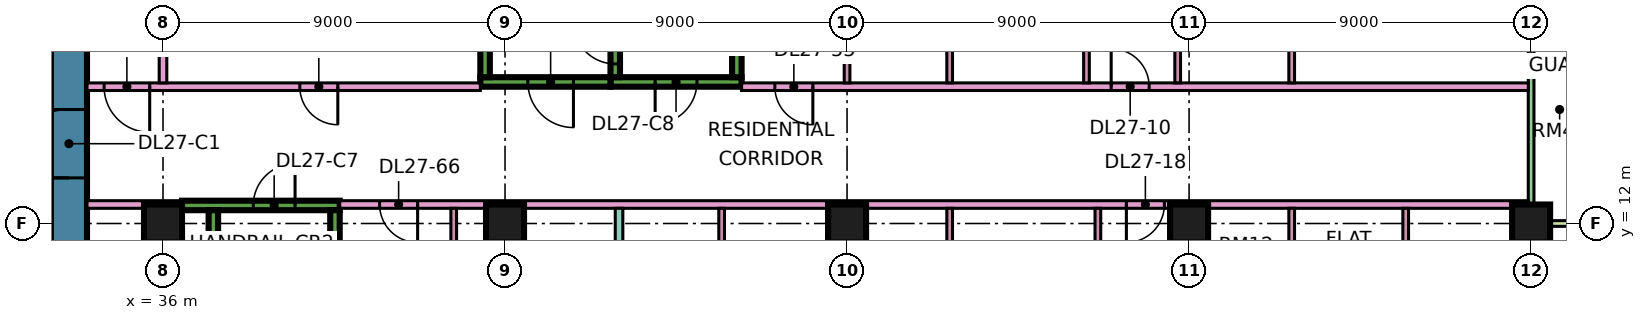
"""IFC4 building model, lengths in metres.
Left out: names, types, materials, properties, quantities, classifications, styles, units other than length and angle.
Written with IfcOpenShell. Run it as: python <this file> out.ifc"""

import sys

from ifc_helpers import new_model, si_unit, direction, frame, frame_2d, origin, origin_2d, place, context, subcontext, project, spatial, rectangle, extrude, element, fill, save


model = new_model("IFC4")
c1 = context("Model", 3, precision=1e-05, world=origin(), true_north=direction((0.0, 1.0)))
c2 = subcontext(c1, "Body", "Model", "MODEL_VIEW")
j1 = project(units=[si_unit("LENGTHUNIT", "METRE"), si_unit("PLANEANGLEUNIT", "RADIAN")], contexts=[c1])
p1 = place(None, origin())
s1 = spatial("IfcSite", under=j1, at=p1, CompositionType="ELEMENT")
p2 = place(p1, origin())
s2 = spatial("IfcBuilding", under=s1, at=p2, CompositionType="ELEMENT")
p3 = place(p2, frame((0.0, 0.0, 118.15)))
s3 = spatial("IfcBuildingStorey", under=s2, at=p3, CompositionType="ELEMENT", Elevation=118.15)
for number, where, z_axis, x_axis in (
    (1, (36.0, 12.0, 0.0), (0.0, 0.0, 1.0), (1.0, 0.0, 0.0)),
    (2, (45.0, 12.0, 0.0), (0.0, 0.0, 1.0), (1.0, 0.0, 0.0)),
    (3, (54.0, 12.0, 0.0), (0.0, 0.0, 1.0), (1.0, 0.0, 0.0)),
    (4, (63.0, 12.0, 0.0), (0.0, 0.0, 1.0), (1.0, 0.0, 0.0)),
    (5, (72.0, 12.0, 0.0), (0.0, 0.0, 1.0), (1.0, 0.0, 0.0)),
):
    element("IfcColumn", number, at=place(p3, frame(where, z_axis=z_axis, x_axis=x_axis)), inside=s3, PredefinedType="COLUMN", context=c2, shape_type="SweptSolid", body=[
        extrude(rectangle(XDim=1.0, YDim=1.0, at=origin_2d()), origin(), (0.0, 0.0, 1.0), 3.75),
    ])
p4 = place(p3, frame((33.525, 7.95, 0.0), z_axis=(0.0, 0.0, 1.0), x_axis=(0.0, 1.0, 0.0)))
e6 = element("IfcWall", 6, at=p4, inside=s3, PredefinedType="SHEAR", context=c2, shape_type="SweptSolid", body=[
    extrude(rectangle(XDim=11.1, YDim=0.95, at=frame_2d((5.55, 0.0))), origin(), (0.0, 0.0, 1.0), 3.75),
])
p5 = place(p4, frame((5.25, 0.0, 0.0)))
e7 = element("IfcOpeningElement", 7, at=p5, cuts=e6, PredefinedType="OPENING", context=c2, shape_type="SweptSolid", body=[
    extrude(rectangle(XDim=1.8, YDim=2.4, at=frame_2d((0.9, 1.2))), frame((0.0, 0.485, 0.0), z_axis=(0.0, -1.0, 0.0), x_axis=(1.0, 0.0, 0.0)), (0.0, 0.0, 1.0), 0.97),
])
p6 = place(p3, frame((36.5, 12.475, 0.0), z_axis=(0.0, 0.0, 1.0), x_axis=(1.0, 0.0, 0.0)))
e8 = element("IfcWall", 8, at=p6, inside=s3, PredefinedType="SHEAR", context=c2, shape_type="SweptSolid", body=[
    extrude(rectangle(XDim=4.15, YDim=0.25, at=frame_2d((2.075, 0.0))), origin(), (0.0, 0.0, 1.0), 3.75),
])
p7 = place(p6, frame((1.875, 0.0, 0.0)))
e9 = element("IfcOpeningElement", 9, at=p7, cuts=e8, PredefinedType="OPENING", context=c2, shape_type="SweptSolid", body=[
    extrude(rectangle(XDim=1.1, YDim=2.2, at=frame_2d((0.55, 1.1))), frame((0.0, 0.135, 0.0), z_axis=(0.0, -1.0, 0.0), x_axis=(1.0, 0.0, 0.0)), (0.0, 0.0, 1.0), 0.27),
])
for number, where, z_axis, x_axis in (
    (10, (37.325, 5.85, 0.0), (0.0, 0.0, 1.0), (0.0, 1.0, 0.0)),
    (11, (40.525, 5.85, 0.0), (0.0, 0.0, 1.0), (0.0, 1.0, 0.0)),
):
    element("IfcWall", number, at=place(p3, frame(where, z_axis=z_axis, x_axis=x_axis)), inside=s3, PredefinedType="SHEAR", context=c2, shape_type="SweptSolid", body=[
        extrude(rectangle(XDim=6.5, YDim=0.25, at=frame_2d((3.25, 0.0))), origin(), (0.0, 0.0, 1.0), 3.75),
    ])
p8 = place(p3, frame((47.775, 15.725, 0.0), z_axis=(0.0, 0.0, 1.0), x_axis=(1.0, 0.0, 0.0)))
e12 = element("IfcWall", 12, at=p8, inside=s3, PredefinedType="SHEAR", context=c2, shape_type="SweptSolid", body=[
    extrude(rectangle(XDim=3.45, YDim=0.25, at=frame_2d((1.725, 0.0))), origin(), (0.0, 0.0, 1.0), 3.75),
])
p9 = place(p8, frame((1.175, 0.0, 0.0)))
e13 = element("IfcOpeningElement", 13, at=p9, cuts=e12, PredefinedType="OPENING", context=c2, shape_type="SweptSolid", body=[
    extrude(rectangle(XDim=1.1, YDim=2.2, at=frame_2d((0.55, 1.1))), frame((0.0, 0.135, 0.0), z_axis=(0.0, -1.0, 0.0), x_axis=(1.0, 0.0, 0.0)), (0.0, 0.0, 1.0), 0.27),
])
p10 = place(p3, frame((47.9, 15.85, 0.0), z_axis=(0.0, 0.0, 1.0), x_axis=(0.0, 1.0, 0.0)))
e14 = element("IfcWall", 14, at=p10, inside=s3, PredefinedType="SHEAR", context=c2, shape_type="SweptSolid", body=[
    extrude(rectangle(XDim=6.5, YDim=0.25, at=frame_2d((3.25, 0.0))), origin(), (0.0, 0.0, 1.0), 3.75),
])
p11 = place(p10, frame((0.35, 0.0, 0.0)))
e15 = element("IfcOpeningElement", 15, at=p11, cuts=e14, PredefinedType="OPENING", context=c2, shape_type="SweptSolid", body=[
    extrude(rectangle(XDim=1.1, YDim=2.2, at=frame_2d((0.55, 1.1))), frame((0.0, 0.135, 0.0), z_axis=(0.0, -1.0, 0.0), x_axis=(1.0, 0.0, 0.0)), (0.0, 0.0, 1.0), 0.27),
])
p12 = place(p3, frame((51.1, 15.85, 0.0), z_axis=(0.0, 0.0, 1.0), x_axis=(0.0, 1.0, 0.0)))
e16 = element("IfcWall", 16, at=p12, inside=s3, PredefinedType="SHEAR", context=c2, shape_type="SweptSolid", body=[
    extrude(rectangle(XDim=6.5, YDim=0.25, at=frame_2d((3.25, 0.0))), origin(), (0.0, 0.0, 1.0), 3.75),
])
p13 = place(p3, frame((44.35, 15.725, 0.0), z_axis=(0.0, 0.0, 1.0), x_axis=(1.0, 0.0, 0.0)))
e17 = element("IfcWall", 17, at=p13, inside=s3, PredefinedType="SHEAR", context=c2, shape_type="SweptSolid", body=[
    extrude(rectangle(XDim=3.425, YDim=0.25, at=frame_2d((1.712, 0.0))), origin(), (0.0, 0.0, 1.0), 3.75),
])
p14 = place(p13, frame((1.25, 0.0, 0.0)))
e18 = element("IfcOpeningElement", 18, at=p14, cuts=e17, PredefinedType="OPENING", context=c2, shape_type="SweptSolid", body=[
    extrude(rectangle(XDim=1.2, YDim=2.2, at=frame_2d((0.6, 1.1))), frame((0.0, 0.135, 0.0), z_axis=(0.0, -1.0, 0.0), x_axis=(1.0, 0.0, 0.0)), (0.0, 0.0, 1.0), 0.27),
])
p15 = place(p3, frame((44.475, 15.85, 0.0), z_axis=(0.0, 0.0, 1.0), x_axis=(0.0, 1.0, 0.0)))
e19 = element("IfcWall", 19, at=p15, inside=s3, PredefinedType="SHEAR", context=c2, shape_type="SweptSolid", body=[
    extrude(rectangle(XDim=6.5, YDim=0.25, at=frame_2d((3.25, 0.0))), origin(), (0.0, 0.0, 1.0), 3.75),
])
p16 = place(p15, frame((1.75, 0.0, 0.0)))
e20 = element("IfcOpeningElement", 20, at=p16, cuts=e19, PredefinedType="OPENING", context=c2, shape_type="SweptSolid", body=[
    extrude(rectangle(XDim=1.1, YDim=2.2, at=frame_2d((0.55, 1.1))), frame((0.0, 0.135, 0.0), z_axis=(0.0, -1.0, 0.0), x_axis=(1.0, 0.0, 0.0)), (0.0, 0.0, 1.0), 0.27),
])
p17 = place(p15, frame((4.3, 0.0, 0.0)))
e21 = element("IfcOpeningElement", 21, at=p17, cuts=e19, PredefinedType="OPENING", context=c2, shape_type="SweptSolid", body=[
    extrude(rectangle(XDim=1.1, YDim=2.2, at=frame_2d((0.55, 1.1))), frame((0.0, 0.135, 0.0), z_axis=(0.0, -1.0, 0.0), x_axis=(1.0, 0.0, 0.0)), (0.0, 0.0, 1.0), 0.27),
])
p18 = place(p3, frame((72.0, 12.075, 0.0), z_axis=(0.0, 0.0, 1.0), x_axis=(0.0, 1.0, 0.0)))
e22 = element("IfcWall", 22, at=p18, inside=s3, PredefinedType="SOLIDWALL", context=c2, shape_type="SweptSolid", body=[
    extrude(rectangle(XDim=10.35, YDim=0.15, at=frame_2d((5.175, 0.0))), origin(), (0.0, 0.0, 1.0), 3.35),
])
p19 = place(p18, frame((3.975, 0.0, 0.45)))
e23 = element("IfcOpeningElement", 23, at=p19, cuts=e22, PredefinedType="OPENING", context=c2, shape_type="SweptSolid", body=[
    extrude(rectangle(XDim=2.4, YDim=2.4, at=frame_2d((1.2, 1.2))), frame((0.0, 0.085, 0.0), z_axis=(0.0, -1.0, 0.0), x_axis=(1.0, 0.0, 0.0)), (0.0, 0.0, 1.0), 0.17),
])
p20 = place(p18, frame((7.688, 0.0, 0.0)))
e24 = element("IfcOpeningElement", 24, at=p20, cuts=e22, PredefinedType="OPENING", context=c2, shape_type="SweptSolid", body=[
    extrude(rectangle(XDim=1.8, YDim=2.4, at=frame_2d((0.9, 1.2))), frame((0.0, 0.085, 0.0), z_axis=(0.0, -1.0, 0.0), x_axis=(1.0, 0.0, 0.0)), (0.0, 0.0, 1.0), 0.17),
])
p21 = place(p3, frame((73.5, 12.0, 0.0), z_axis=(0.0, 0.0, 1.0), x_axis=(-1.0, 0.0, 0.0)))
e25 = element("IfcWall", 25, at=p21, inside=s3, PredefinedType="SOLIDWALL", context=c2, shape_type="SweptSolid", body=[
    extrude(rectangle(XDim=1.5, YDim=0.15, at=frame_2d((0.75, 0.0))), origin(), (0.0, 0.0, 1.0), 3.35),
])
p22 = place(p3, frame((34.0, 12.5, 0.0), z_axis=(0.0, 0.0, 1.0), x_axis=(1.0, 0.0, 0.0)))
e26 = element("IfcWall", 26, at=p22, inside=s3, PredefinedType="PARTITIONING", context=c2, shape_type="SweptSolid", body=[
    extrude(rectangle(XDim=2.501, YDim=0.2, at=frame_2d((1.25, 0.0))), origin(), (0.0, 0.0, 1.0), 3.35),
])
p23 = place(p3, frame((34.0, 15.6, 0.0), z_axis=(0.0, 0.0, 1.0), x_axis=(1.0, 0.0, 0.0)))
e27 = element("IfcWall", 27, at=p23, inside=s3, PredefinedType="PARTITIONING", context=c2, shape_type="SweptSolid", body=[
    extrude(rectangle(XDim=10.35, YDim=0.2, at=frame_2d((5.175, 0.0))), origin(), (0.0, 0.0, 1.0), 3.35),
])
p24 = place(p23, frame((5.6, 0.0, 0.0)))
e28 = element("IfcOpeningElement", 28, at=p24, cuts=e27, PredefinedType="OPENING", context=c2, shape_type="SweptSolid", body=[
    extrude(rectangle(XDim=1.0, YDim=2.1, at=frame_2d((0.5, 1.05))), frame((0.0, 0.11, 0.0), z_axis=(0.0, -1.0, 0.0), x_axis=(1.0, 0.0, 0.0)), (0.0, 0.0, 1.0), 0.22),
])
p25 = place(p23, frame((0.45, 0.0, 0.0)))
e29 = element("IfcOpeningElement", 29, at=p25, cuts=e27, PredefinedType="OPENING", context=c2, shape_type="SweptSolid", body=[
    extrude(rectangle(XDim=1.2, YDim=2.1, at=frame_2d((0.6, 1.05))), frame((0.0, 0.11, 0.0), z_axis=(0.0, -1.0, 0.0), x_axis=(1.0, 0.0, 0.0)), (0.0, 0.0, 1.0), 0.22),
])
p26 = place(p3, frame((36.0, 15.7, 0.0), z_axis=(0.0, 0.0, 1.0), x_axis=(0.0, 1.0, 0.0)))
e30 = element("IfcWall", 30, at=p26, inside=s3, PredefinedType="PARTITIONING", context=c2, shape_type="SweptSolid", body=[
    extrude(rectangle(XDim=8.3, YDim=0.2, at=frame_2d((4.15, 0.0))), origin(), (0.0, 0.0, 1.0), 3.35),
])
p27 = place(p3, frame((40.65, 12.5, 0.0), z_axis=(0.0, 0.0, 1.0), x_axis=(1.0, 0.0, 0.0)))
e31 = element("IfcWall", 31, at=p27, inside=s3, PredefinedType="PARTITIONING", context=c2, shape_type="SweptSolid", body=[
    extrude(rectangle(XDim=31.276, YDim=0.2, at=frame_2d((15.638, 0.0))), origin(), (0.0, 0.0, 1.0), 3.35),
])
p28 = place(p27, frame((20.7, 0.0, 0.0)))
e32 = element("IfcOpeningElement", 32, at=p28, cuts=e31, PredefinedType="OPENING", context=c2, shape_type="SweptSolid", body=[
    extrude(rectangle(XDim=1.0, YDim=2.1, at=frame_2d((0.5, 1.05))), frame((0.0, 0.11, 0.0), z_axis=(0.0, -1.0, 0.0), x_axis=(1.0, 0.0, 0.0)), (0.0, 0.0, 1.0), 0.22),
])
p29 = place(p27, frame((1.05, 0.0, 0.0)))
e33 = element("IfcOpeningElement", 33, at=p29, cuts=e31, PredefinedType="OPENING", context=c2, shape_type="SweptSolid", body=[
    extrude(rectangle(XDim=1.0, YDim=2.1, at=frame_2d((0.5, 1.05))), frame((0.0, 0.11, 0.0), z_axis=(0.0, -1.0, 0.0), x_axis=(1.0, 0.0, 0.0)), (0.0, 0.0, 1.0), 0.22),
])
p30 = place(p3, frame((43.65, 5.825, 0.0), z_axis=(0.0, 0.0, 1.0), x_axis=(0.0, 1.0, 0.0)))
e34 = element("IfcWall", 34, at=p30, inside=s3, PredefinedType="PARTITIONING", context=c2, shape_type="SweptSolid", body=[
    extrude(rectangle(XDim=6.575, YDim=0.15, at=frame_2d((3.288, 0.0))), origin(), (0.0, 0.0, 1.0), 3.35),
])
p31 = place(p30, frame((4.425, 0.0, 0.0)))
e35 = element("IfcOpeningElement", 35, at=p31, cuts=e34, PredefinedType="OPENING", context=c2, shape_type="SweptSolid", body=[
    extrude(rectangle(XDim=0.9, YDim=2.1, at=frame_2d((0.45, 1.05))), frame((0.0, 0.085, 0.0), z_axis=(0.0, -1.0, 0.0), x_axis=(1.0, 0.0, 0.0)), (0.0, 0.0, 1.0), 0.17),
])
p32 = place(p3, frame((48.0, 0.0, 0.0), z_axis=(0.0, 0.0, 1.0), x_axis=(0.0, 1.0, 0.0)))
e36 = element("IfcWall", 36, at=p32, inside=s3, PredefinedType="PARTITIONING", context=c2, shape_type="SweptSolid", body=[
    extrude(rectangle(XDim=12.4, YDim=0.2, at=frame_2d((6.2, 0.0))), origin(), (0.0, 0.0, 1.0), 3.35),
])
p33 = place(p3, frame((50.7, 8.375, 0.0), z_axis=(0.0, 0.0, 1.0), x_axis=(0.0, 1.0, 0.0)))
e37 = element("IfcWall", 37, at=p33, inside=s3, PredefinedType="PARTITIONING", context=c2, shape_type="SweptSolid", body=[
    extrude(rectangle(XDim=4.025, YDim=0.15, at=frame_2d((2.012, 0.0))), origin(), (0.0, 0.0, 1.0), 3.35),
])
p34 = place(p3, frame((51.225, 15.6, 0.0), z_axis=(0.0, 0.0, 1.0), x_axis=(1.0, 0.0, 0.0)))
e38 = element("IfcWall", 38, at=p34, inside=s3, PredefinedType="PARTITIONING", context=c2, shape_type="SweptSolid", body=[
    extrude(rectangle(XDim=20.701, YDim=0.2, at=frame_2d((10.351, 0.0))), origin(), (0.0, 0.0, 1.0), 3.35),
])
p35 = place(p34, frame((9.725, 0.0, 0.0)))
e39 = element("IfcOpeningElement", 39, at=p35, cuts=e38, PredefinedType="OPENING", context=c2, shape_type="SweptSolid", body=[
    extrude(rectangle(XDim=1.0, YDim=2.1, at=frame_2d((0.5, 1.05))), frame((0.0, 0.11, 0.0), z_axis=(0.0, -1.0, 0.0), x_axis=(1.0, 0.0, 0.0)), (0.0, 0.0, 1.0), 0.22),
])
p36 = place(p34, frame((0.875, 0.0, 0.0)))
e40 = element("IfcOpeningElement", 40, at=p36, cuts=e38, PredefinedType="OPENING", context=c2, shape_type="SweptSolid", body=[
    extrude(rectangle(XDim=1.0, YDim=2.1, at=frame_2d((0.5, 1.05))), frame((0.0, 0.11, 0.0), z_axis=(0.0, -1.0, 0.0), x_axis=(1.0, 0.0, 0.0)), (0.0, 0.0, 1.0), 0.22),
])
p37 = place(p3, frame((53.7, 8.375, 0.0), z_axis=(0.0, 0.0, 1.0), x_axis=(0.0, 1.0, 0.0)))
e41 = element("IfcWall", 41, at=p37, inside=s3, PredefinedType="PARTITIONING", context=c2, shape_type="SweptSolid", body=[
    extrude(rectangle(XDim=4.025, YDim=0.15, at=frame_2d((2.012, 0.0))), origin(), (0.0, 0.0, 1.0), 3.35),
])
p38 = place(p3, frame((54.0, 15.7, 0.0), z_axis=(0.0, 0.0, 1.0), x_axis=(0.0, 1.0, 0.0)))
e42 = element("IfcWall", 42, at=p38, inside=s3, PredefinedType="PARTITIONING", context=c2, shape_type="SweptSolid", body=[
    extrude(rectangle(XDim=3.2, YDim=0.15, at=frame_2d((1.6, 0.0))), origin(), (0.0, 0.0, 1.0), 3.35),
])
p39 = place(p3, frame((56.7, 8.375, 0.0), z_axis=(0.0, 0.0, 1.0), x_axis=(0.0, 1.0, 0.0)))
e43 = element("IfcWall", 43, at=p39, inside=s3, PredefinedType="PARTITIONING", context=c2, shape_type="SweptSolid", body=[
    extrude(rectangle(XDim=4.025, YDim=0.15, at=frame_2d((2.012, 0.0))), origin(), (0.0, 0.0, 1.0), 3.35),
])
for number, where, z_axis, x_axis in (
    (44, (56.7, 15.7, 0.0), (0.0, 0.0, 1.0), (0.0, 1.0, 0.0)),
    (45, (60.3, 15.7, 0.0), (0.0, 0.0, 1.0), (0.0, 1.0, 0.0)),
):
    element("IfcWall", number, at=place(p3, frame(where, z_axis=z_axis, x_axis=x_axis)), inside=s3, PredefinedType="PARTITIONING", context=c2, shape_type="SweptSolid", body=[
        extrude(rectangle(XDim=3.125, YDim=0.15, at=frame_2d((1.562, 0.0))), origin(), (0.0, 0.0, 1.0), 3.35),
    ])
p40 = place(p3, frame((60.6, 8.375, 0.0), z_axis=(0.0, 0.0, 1.0), x_axis=(0.0, 1.0, 0.0)))
e46 = element("IfcWall", 46, at=p40, inside=s3, PredefinedType="PARTITIONING", context=c2, shape_type="SweptSolid", body=[
    extrude(rectangle(XDim=4.025, YDim=0.15, at=frame_2d((2.012, 0.0))), origin(), (0.0, 0.0, 1.0), 3.35),
])
p41 = place(p3, frame((62.7, 15.7, 0.0), z_axis=(0.0, 0.0, 1.0), x_axis=(0.0, 1.0, 0.0)))
e47 = element("IfcWall", 47, at=p41, inside=s3, PredefinedType="PARTITIONING", context=c2, shape_type="SweptSolid", body=[
    extrude(rectangle(XDim=3.125, YDim=0.15, at=frame_2d((1.562, 0.0))), origin(), (0.0, 0.0, 1.0), 3.35),
])
p42 = place(p41, frame((1.1, 0.0, 0.0)))
e48 = element("IfcOpeningElement", 48, at=p42, cuts=e47, PredefinedType="OPENING", context=c2, shape_type="SweptSolid", body=[
    extrude(rectangle(XDim=0.8, YDim=2.1, at=frame_2d((0.4, 1.05))), frame((0.0, 0.085, 0.0), z_axis=(0.0, -1.0, 0.0), x_axis=(1.0, 0.0, 0.0)), (0.0, 0.0, 1.0), 0.17),
])
p43 = place(p3, frame((63.3, 8.375, 0.0), z_axis=(0.0, 0.0, 1.0), x_axis=(0.0, 1.0, 0.0)))
e49 = element("IfcWall", 49, at=p43, inside=s3, PredefinedType="PARTITIONING", context=c2, shape_type="SweptSolid", body=[
    extrude(rectangle(XDim=4.025, YDim=0.15, at=frame_2d((2.012, 0.0))), origin(), (0.0, 0.0, 1.0), 3.35),
])
p44 = place(p43, frame((1.575, 0.0, 0.0)))
e50 = element("IfcOpeningElement", 50, at=p44, cuts=e49, PredefinedType="OPENING", context=c2, shape_type="SweptSolid", body=[
    extrude(rectangle(XDim=0.8, YDim=2.1, at=frame_2d((0.4, 1.05))), frame((0.0, 0.085, 0.0), z_axis=(0.0, -1.0, 0.0), x_axis=(1.0, 0.0, 0.0)), (0.0, 0.0, 1.0), 0.17),
])
p45 = place(p3, frame((65.7, 8.375, 0.0), z_axis=(0.0, 0.0, 1.0), x_axis=(0.0, 1.0, 0.0)))
e51 = element("IfcWall", 51, at=p45, inside=s3, PredefinedType="PARTITIONING", context=c2, shape_type="SweptSolid", body=[
    extrude(rectangle(XDim=4.025, YDim=0.15, at=frame_2d((2.012, 0.0))), origin(), (0.0, 0.0, 1.0), 3.35),
])
p46 = place(p3, frame((65.7, 15.7, 0.0), z_axis=(0.0, 0.0, 1.0), x_axis=(0.0, 1.0, 0.0)))
e52 = element("IfcWall", 52, at=p46, inside=s3, PredefinedType="PARTITIONING", context=c2, shape_type="SweptSolid", body=[
    extrude(rectangle(XDim=3.125, YDim=0.15, at=frame_2d((1.562, 0.0))), origin(), (0.0, 0.0, 1.0), 3.35),
])
p47 = place(p3, frame((68.7, 8.375, 0.0), z_axis=(0.0, 0.0, 1.0), x_axis=(0.0, 1.0, 0.0)))
e53 = element("IfcWall", 53, at=p47, inside=s3, PredefinedType="PARTITIONING", context=c2, shape_type="SweptSolid", body=[
    extrude(rectangle(XDim=4.025, YDim=0.15, at=frame_2d((2.012, 0.0))), origin(), (0.0, 0.0, 1.0), 3.35),
])
p48 = place(p19, origin())
e54 = element("IfcWindow", 54, at=p48, inside=s3, PartitioningType="SINGLE_PANEL", PredefinedType="WINDOW", context=c2, shape_type="SweptSolid", body=[
    extrude(rectangle(XDim=2.4, YDim=2.4, at=frame_2d((1.2, 1.2))), frame((0.0, 0.03, 0.0), z_axis=(0.0, -1.0, 0.0), x_axis=(1.0, 0.0, 0.0)), (0.0, 0.0, 1.0), 0.06),
])
fill(e23, e54)
p49 = place(p5, origin())
e55 = element("IfcDoor", 55, at=p49, inside=s3, OperationType="DOUBLE_DOOR_SINGLE_SWING", PredefinedType="DOOR", context=c2, shape_type="SweptSolid", body=[
    extrude(rectangle(XDim=1.8, YDim=2.4, at=frame_2d((0.9, 1.2))), frame((0.0, 0.025, 0.0), z_axis=(0.0, -1.0, 0.0), x_axis=(1.0, 0.0, 0.0)), (0.0, 0.0, 1.0), 0.05),
])
fill(e7, e55)
p50 = place(p7, frame((1.1, 0.0, 0.0), z_axis=(0.0, 0.0, 1.0), x_axis=(-1.0, 0.0, 0.0)))
e56 = element("IfcDoor", 56, at=p50, inside=s3, OperationType="SINGLE_SWING_RIGHT", PredefinedType="DOOR", context=c2, shape_type="SweptSolid", body=[
    extrude(rectangle(XDim=1.1, YDim=2.2, at=frame_2d((0.55, 1.1))), frame((0.0, 0.025, 0.0), z_axis=(0.0, -1.0, 0.0), x_axis=(1.0, 0.0, 0.0)), (0.0, 0.0, 1.0), 0.05),
])
fill(e9, e56)
p51 = place(p9, frame((1.1, 0.0, 0.0), z_axis=(0.0, 0.0, 1.0), x_axis=(-1.0, 0.0, 0.0)))
e57 = element("IfcDoor", 57, at=p51, inside=s3, OperationType="SINGLE_SWING_LEFT", PredefinedType="DOOR", context=c2, shape_type="SweptSolid", body=[
    extrude(rectangle(XDim=1.1, YDim=2.2, at=frame_2d((0.55, 1.1))), frame((0.0, 0.025, 0.0), z_axis=(0.0, -1.0, 0.0), x_axis=(1.0, 0.0, 0.0)), (0.0, 0.0, 1.0), 0.05),
])
fill(e13, e57)
p52 = place(p14, origin())
e58 = element("IfcDoor", 58, at=p52, inside=s3, OperationType="SINGLE_SWING_RIGHT", PredefinedType="DOOR", context=c2, shape_type="SweptSolid", body=[
    extrude(rectangle(XDim=1.2, YDim=2.2, at=frame_2d((0.6, 1.1))), frame((0.0, 0.025, 0.0), z_axis=(0.0, -1.0, 0.0), x_axis=(1.0, 0.0, 0.0)), (0.0, 0.0, 1.0), 0.05),
])
fill(e18, e58)
p53 = place(p11, frame((1.1, 0.0, 0.0), z_axis=(0.0, 0.0, 1.0), x_axis=(-1.0, 0.0, 0.0)))
e59 = element("IfcDoor", 59, at=p53, inside=s3, OperationType="SINGLE_SWING_RIGHT", PredefinedType="DOOR", context=c2, shape_type="SweptSolid", body=[
    extrude(rectangle(XDim=1.1, YDim=2.2, at=frame_2d((0.55, 1.1))), frame((0.0, 0.025, 0.0), z_axis=(0.0, -1.0, 0.0), x_axis=(1.0, 0.0, 0.0)), (0.0, 0.0, 1.0), 0.05),
])
fill(e15, e59)
p54 = place(p24, origin())
e60 = element("IfcDoor", 60, at=p54, inside=s3, OperationType="SINGLE_SWING_RIGHT", PredefinedType="DOOR", context=c2, shape_type="SweptSolid", body=[
    extrude(rectangle(XDim=1.0, YDim=2.1, at=frame_2d((0.5, 1.05))), frame((0.0, 0.025, 0.0), z_axis=(0.0, -1.0, 0.0), x_axis=(1.0, 0.0, 0.0)), (0.0, 0.0, 1.0), 0.05),
])
fill(e28, e60)
p55 = place(p35, origin())
e61 = element("IfcDoor", 61, at=p55, inside=s3, OperationType="SINGLE_SWING_LEFT", PredefinedType="DOOR", context=c2, shape_type="SweptSolid", body=[
    extrude(rectangle(XDim=1.0, YDim=2.1, at=frame_2d((0.5, 1.05))), frame((0.0, 0.025, 0.0), z_axis=(0.0, -1.0, 0.0), x_axis=(1.0, 0.0, 0.0)), (0.0, 0.0, 1.0), 0.05),
])
fill(e39, e61)
p56 = place(p28, frame((1.0, 0.0, 0.0), z_axis=(0.0, 0.0, 1.0), x_axis=(-1.0, 0.0, 0.0)))
e62 = element("IfcDoor", 62, at=p56, inside=s3, OperationType="SINGLE_SWING_LEFT", PredefinedType="DOOR", context=c2, shape_type="SweptSolid", body=[
    extrude(rectangle(XDim=1.0, YDim=2.1, at=frame_2d((0.5, 1.05))), frame((0.0, 0.025, 0.0), z_axis=(0.0, -1.0, 0.0), x_axis=(1.0, 0.0, 0.0)), (0.0, 0.0, 1.0), 0.05),
])
fill(e32, e62)
p57 = place(p25, origin())
e63 = element("IfcDoor", 63, at=p57, inside=s3, OperationType="SINGLE_SWING_RIGHT", PredefinedType="DOOR", context=c2, shape_type="SweptSolid", body=[
    extrude(rectangle(XDim=1.2, YDim=2.1, at=frame_2d((0.6, 1.05))), frame((0.0, 0.025, 0.0), z_axis=(0.0, -1.0, 0.0), x_axis=(1.0, 0.0, 0.0)), (0.0, 0.0, 1.0), 0.05),
])
fill(e29, e63)
p58 = place(p36, origin())
e64 = element("IfcDoor", 64, at=p58, inside=s3, OperationType="SINGLE_SWING_RIGHT", PredefinedType="DOOR", context=c2, shape_type="SweptSolid", body=[
    extrude(rectangle(XDim=1.0, YDim=2.1, at=frame_2d((0.5, 1.05))), frame((0.0, 0.025, 0.0), z_axis=(0.0, -1.0, 0.0), x_axis=(1.0, 0.0, 0.0)), (0.0, 0.0, 1.0), 0.05),
])
fill(e40, e64)
p59 = place(p29, origin())
e65 = element("IfcDoor", 65, at=p59, inside=s3, OperationType="SINGLE_SWING_RIGHT", PredefinedType="DOOR", context=c2, shape_type="SweptSolid", body=[
    extrude(rectangle(XDim=1.0, YDim=2.1, at=frame_2d((0.5, 1.05))), frame((0.0, 0.025, 0.0), z_axis=(0.0, -1.0, 0.0), x_axis=(1.0, 0.0, 0.0)), (0.0, 0.0, 1.0), 0.05),
])
fill(e33, e65)
save(model, sys.argv[1])
